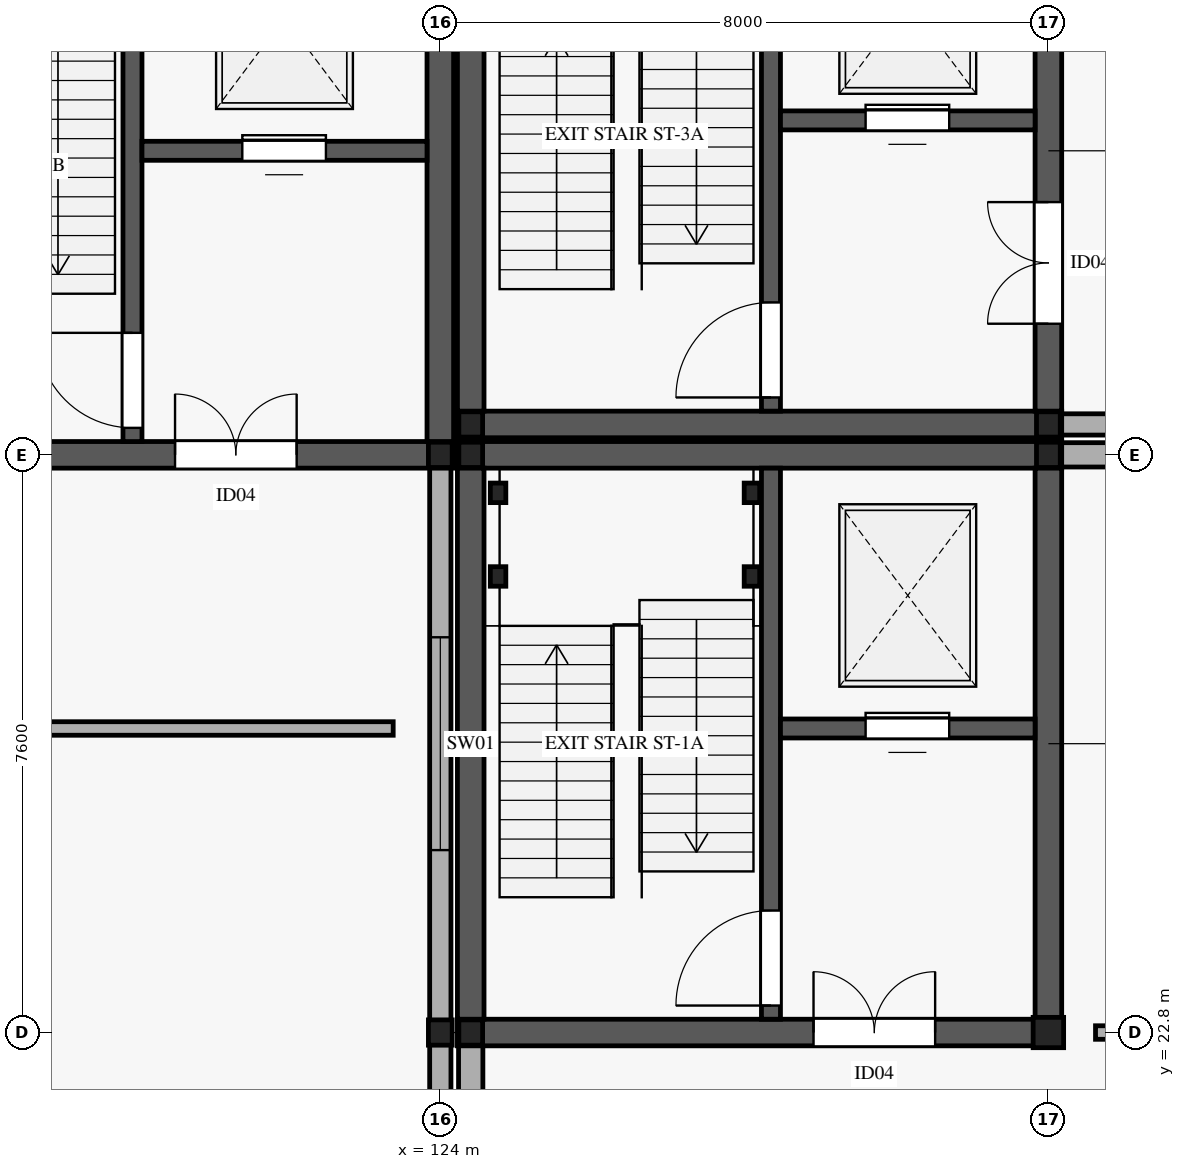
"""IFC4 building model, lengths in metres.
Left out: names, types, materials, properties, quantities, classifications, styles, units other than length and angle.
Written with IfcOpenShell. Run it as: python <this file> out.ifc"""

import sys

from ifc_helpers import new_model, si_unit, direction, frame, frame_2d, origin, origin_2d, place, context, subcontext, project, spatial, rectangle, i_section, extrude, element, fill, save


model = new_model("IFC4")
c1 = context("Model", 3, precision=1e-05, world=origin(), true_north=direction((0.0, 1.0)))
c2 = subcontext(c1, "Body", "Model", "MODEL_VIEW")
j1 = project(units=[si_unit("LENGTHUNIT", "METRE"), si_unit("PLANEANGLEUNIT", "RADIAN")], contexts=[c1])
p1 = place(None, origin())
s1 = spatial("IfcSite", under=j1, at=p1, CompositionType="ELEMENT")
p2 = place(p1, origin())
s2 = spatial("IfcBuilding", under=s1, at=p2, CompositionType="ELEMENT")
p3 = place(p2, origin())
s3 = spatial("IfcBuildingStorey", under=s2, at=p3, CompositionType="ELEMENT", Elevation=0.0)
for number, where, z_axis, x_axis in (
    (1, (124.4, 22.8, 0.0), (0.0, 0.0, 1.0), (1.0, 0.0, 0.0)),
    (2, (124.4, 30.4, 0.0), (0.0, 0.0, 1.0), (1.0, 0.0, 0.0)),
):
    element("IfcColumn", number, at=place(p3, frame(where, z_axis=z_axis, x_axis=x_axis)), inside=s3, PredefinedType="COLUMN", context=c2, shape_type="SweptSolid", body=[
        extrude(i_section(OverallWidth=0.313, OverallDepth=0.333, WebThickness=0.018, FlangeThickness=0.028, FilletRadius=0.015, at=origin_2d()), origin(), (0.0, 0.0, 1.0), 5.185),
    ])
p4 = place(p3, frame((132.0, 22.8, 0.0), z_axis=(0.0, 0.0, 1.0), x_axis=(1.0, 0.0, 0.0)))
e3 = element("IfcColumn", 3, at=p4, inside=s3, PredefinedType="COLUMN", context=c2, shape_type="SweptSolid", body=[
    extrude(i_section(OverallWidth=0.401, OverallDepth=0.399, WebThickness=0.025, FlangeThickness=0.04, FilletRadius=0.015, at=origin_2d()), origin(), (0.0, 0.0, 1.0), 5.185),
])
for number, where, z_axis, x_axis in (
    (4, (132.0, 30.4, 0.0), (0.0, 0.0, 1.0), (1.0, 0.0, 0.0)),
    (5, (124.4, 30.8, 0.0), (0.0, 0.0, 1.0), (1.0, 0.0, 0.0)),
    (6, (132.0, 30.8, 0.0), (0.0, 0.0, 1.0), (1.0, 0.0, 0.0)),
    (7, (124.0, 22.8, 0.0), (0.0, 0.0, 1.0), (1.0, 0.0, 0.0)),
    (8, (124.0, 30.4, 0.0), (0.0, 0.0, 1.0), (1.0, 0.0, 0.0)),
):
    element("IfcColumn", number, at=place(p3, frame(where, z_axis=z_axis, x_axis=x_axis)), inside=s3, PredefinedType="COLUMN", context=c2, shape_type="SweptSolid", body=[
        extrude(i_section(OverallWidth=0.313, OverallDepth=0.333, WebThickness=0.018, FlangeThickness=0.028, FilletRadius=0.015, at=origin_2d()), origin(), (0.0, 0.0, 1.0), 5.185),
    ])
p5 = place(p3, frame((124.4, 15.18, 0.0), z_axis=(0.0, 0.0, 1.0), x_axis=(0.0, 1.0, 0.0)))
e9 = element("IfcWall", 9, at=p5, inside=s3, PredefinedType="STANDARD", context=c2, shape_type="SweptSolid", body=[
    extrude(rectangle(XDim=7.64, YDim=0.32, at=frame_2d((3.82, 0.0))), origin(), (0.0, 0.0, 1.0), 4.25),
])
p6 = place(p5, frame((3.02, 0.0, 0.75)))
e10 = element("IfcOpeningElement", 10, at=p6, cuts=e9, PredefinedType="OPENING", context=c2, shape_type="SweptSolid", body=[
    extrude(rectangle(XDim=1.6, YDim=2.0, at=frame_2d((0.8, 1.0))), frame((0.0, 0.17, 0.0), z_axis=(0.0, -1.0, 0.0), x_axis=(1.0, 0.0, 0.0)), (0.0, 0.0, 1.0), 0.34),
])
p7 = place(p3, frame((131.98, 30.4, 0.0), z_axis=(0.0, 0.0, 1.0), x_axis=(1.0, 0.0, 0.0)))
e11 = element("IfcWall", 11, at=p7, inside=s3, PredefinedType="STANDARD", context=c2, shape_type="SweptSolid", body=[
    extrude(rectangle(XDim=8.04, YDim=0.32, at=frame_2d((4.02, 0.0))), origin(), (0.0, 0.0, 1.0), 4.25),
])
p8 = place(p7, frame((3.12, 0.0, 0.75)))
e12 = element("IfcOpeningElement", 12, at=p8, cuts=e11, PredefinedType="OPENING", context=c2, shape_type="SweptSolid", body=[
    extrude(rectangle(XDim=1.8, YDim=2.0, at=frame_2d((0.9, 1.0))), frame((0.0, 0.17, 0.0), z_axis=(0.0, -1.0, 0.0), x_axis=(1.0, 0.0, 0.0)), (0.0, 0.0, 1.0), 0.34),
])
p9 = place(p3, frame((140.02, 30.8, 0.0), z_axis=(0.0, 0.0, 1.0), x_axis=(-1.0, 0.0, 0.0)))
e13 = element("IfcWall", 13, at=p9, inside=s3, PredefinedType="STANDARD", context=c2, shape_type="SweptSolid", body=[
    extrude(rectangle(XDim=8.04, YDim=0.28, at=frame_2d((4.02, 0.0))), origin(), (0.0, 0.0, 1.0), 4.25),
])
p10 = place(p9, frame((2.62, 0.0, 0.75)))
e14 = element("IfcOpeningElement", 14, at=p10, cuts=e13, PredefinedType="OPENING", context=c2, shape_type="SweptSolid", body=[
    extrude(rectangle(XDim=2.8, YDim=2.0, at=frame_2d((1.4, 1.0))), frame((0.0, 0.15, 0.0), z_axis=(0.0, -1.0, 0.0), x_axis=(1.0, 0.0, 0.0)), (0.0, 0.0, 1.0), 0.3),
])
p11 = place(p3, frame((124.0, 30.42, 0.0), z_axis=(0.0, 0.0, 1.0), x_axis=(0.0, -1.0, 0.0)))
e15 = element("IfcWall", 15, at=p11, inside=s3, PredefinedType="STANDARD", context=c2, shape_type="SweptSolid", body=[
    extrude(rectangle(XDim=7.64, YDim=0.28, at=frame_2d((3.82, 0.0))), origin(), (0.0, 0.0, 1.0), 4.25),
])
p12 = place(p11, frame((2.42, 0.0, 0.75)))
e16 = element("IfcOpeningElement", 16, at=p12, cuts=e15, PredefinedType="OPENING", context=c2, shape_type="SweptSolid", body=[
    extrude(rectangle(XDim=2.8, YDim=2.0, at=frame_2d((1.4, 1.0))), frame((0.0, 0.15, 0.0), z_axis=(0.0, -1.0, 0.0), x_axis=(1.0, 0.0, 0.0)), (0.0, 0.0, 1.0), 0.3),
])
p13 = place(p3, frame((124.0, 22.82, 0.0), z_axis=(0.0, 0.0, 1.0), x_axis=(0.0, -1.0, 0.0)))
e17 = element("IfcWall", 17, at=p13, inside=s3, PredefinedType="STANDARD", context=c2, shape_type="SweptSolid", body=[
    extrude(rectangle(XDim=7.64, YDim=0.28, at=frame_2d((3.82, 0.0))), origin(), (0.0, 0.0, 1.0), 4.25),
])
p14 = place(p13, frame((2.22, 0.0, 0.75)))
e18 = element("IfcOpeningElement", 18, at=p14, cuts=e17, PredefinedType="OPENING", context=c2, shape_type="SweptSolid", body=[
    extrude(rectangle(XDim=3.2, YDim=2.0, at=frame_2d((1.6, 1.0))), frame((0.0, 0.15, 0.0), z_axis=(0.0, -1.0, 0.0), x_axis=(1.0, 0.0, 0.0)), (0.0, 0.0, 1.0), 0.3),
])
p15 = place(p3, frame((124.225, 22.8, 0.0), z_axis=(0.0, 0.0, 1.0), x_axis=(1.0, 0.0, 0.0)))
e19 = element("IfcWall", 19, at=p15, inside=s3, PredefinedType="SHEAR", context=c2, shape_type="SweptSolid", body=[
    extrude(rectangle(XDim=7.95, YDim=0.35, at=frame_2d((3.975, 0.0))), origin(), (0.0, 0.0, 1.0), 5.19),
])
p16 = place(p15, frame((4.685, 0.0, 0.0)))
e20 = element("IfcOpeningElement", 20, at=p16, cuts=e19, PredefinedType="OPENING", context=c2, shape_type="SweptSolid", body=[
    extrude(rectangle(XDim=1.6, YDim=2.35, at=frame_2d((0.8, 1.175))), frame((0.0, 0.185, 0.0), z_axis=(0.0, -1.0, 0.0), x_axis=(1.0, 0.0, 0.0)), (0.0, 0.0, 1.0), 0.37),
])
p17 = place(p3, frame((124.225, 30.4, 0.0), z_axis=(0.0, 0.0, 1.0), x_axis=(1.0, 0.0, 0.0)))
e21 = element("IfcWall", 21, at=p17, inside=s3, PredefinedType="SHEAR", context=c2, shape_type="SweptSolid", body=[
    extrude(rectangle(XDim=7.95, YDim=0.35, at=frame_2d((3.975, 0.0))), origin(), (0.0, 0.0, 1.0), 5.19),
])
for number, where, z_axis, x_axis in (
    (22, (124.4, 22.975, 0.0), (0.0, 0.0, 1.0), (0.0, 1.0, 0.0)),
    (23, (132.0, 22.975, 0.0), (0.0, 0.0, 1.0), (0.0, 1.0, 0.0)),
):
    element("IfcWall", number, at=place(p3, frame(where, z_axis=z_axis, x_axis=x_axis)), inside=s3, PredefinedType="SHEAR", context=c2, shape_type="SweptSolid", body=[
        extrude(rectangle(XDim=7.25, YDim=0.35, at=frame_2d((3.625, 0.0))), origin(), (0.0, 0.0, 1.0), 5.19),
    ])
p18 = place(p3, frame((128.35, 22.975, 0.0), z_axis=(0.0, 0.0, 1.0), x_axis=(0.0, 1.0, 0.0)))
e24 = element("IfcWall", 24, at=p18, inside=s3, PredefinedType="SHEAR", context=c2, shape_type="SweptSolid", body=[
    extrude(rectangle(XDim=7.25, YDim=0.25, at=frame_2d((3.625, 0.0))), origin(), (0.0, 0.0, 1.0), 5.19),
])
p19 = place(p18, frame((0.18, 0.0, 0.0)))
e25 = element("IfcOpeningElement", 25, at=p19, cuts=e24, PredefinedType="OPENING", context=c2, shape_type="SweptSolid", body=[
    extrude(rectangle(XDim=1.25, YDim=2.2, at=frame_2d((0.625, 1.1))), frame((0.0, 0.135, 0.0), z_axis=(0.0, -1.0, 0.0), x_axis=(1.0, 0.0, 0.0)), (0.0, 0.0, 1.0), 0.27),
])
p20 = place(p3, frame((128.475, 26.8, 0.0), z_axis=(0.0, 0.0, 1.0), x_axis=(1.0, 0.0, 0.0)))
e26 = element("IfcWall", 26, at=p20, inside=s3, PredefinedType="SHEAR", context=c2, shape_type="SweptSolid", body=[
    extrude(rectangle(XDim=3.35, YDim=0.25, at=frame_2d((1.675, 0.0))), origin(), (0.0, 0.0, 1.0), 5.19),
])
p21 = place(p20, frame((1.12, 0.0, 0.0)))
e27 = element("IfcOpeningElement", 27, at=p21, cuts=e26, PredefinedType="OPENING", context=c2, shape_type="SweptSolid", body=[
    extrude(rectangle(XDim=1.1, YDim=2.2, at=frame_2d((0.55, 1.1))), frame((0.0, 0.135, 0.0), z_axis=(0.0, -1.0, 0.0), x_axis=(1.0, 0.0, 0.0)), (0.0, 0.0, 1.0), 0.27),
])
for number, where, z_axis, x_axis in (
    (28, (124.76, 28.8, -0.23), (0.0, 0.0, 1.0), (1.0, 0.0, 0.0)),
    (29, (128.1, 28.8, -0.23), (0.0, 0.0, 1.0), (1.0, 0.0, 0.0)),
    (30, (124.76, 29.9, -0.23), (0.0, 0.0, 1.0), (1.0, 0.0, 0.0)),
    (31, (128.1, 29.9, -0.23), (0.0, 0.0, 1.0), (1.0, 0.0, 0.0)),
):
    element("IfcColumn", number, at=place(p3, frame(where, z_axis=z_axis, x_axis=x_axis)), inside=s3, PredefinedType="COLUMN", context=c2, shape_type="SweptSolid", body=[
        extrude(i_section(OverallWidth=0.204, OverallDepth=0.257, WebThickness=0.009, FlangeThickness=0.016, FilletRadius=0.013, at=origin_2d()), origin(), (0.0, 0.0, 1.0), 5.625),
    ])
p22 = place(p3, frame((124.225, 30.8, 0.0), z_axis=(0.0, 0.0, 1.0), x_axis=(1.0, 0.0, 0.0)))
e32 = element("IfcWall", 32, at=p22, inside=s3, PredefinedType="SHEAR", context=c2, shape_type="SweptSolid", body=[
    extrude(rectangle(XDim=7.95, YDim=0.35, at=frame_2d((3.975, 0.0))), origin(), (0.0, 0.0, 1.0), 5.19),
])
p23 = place(p3, frame((124.4, 30.975, 0.0), z_axis=(0.0, 0.0, 1.0), x_axis=(0.0, 1.0, 0.0)))
e33 = element("IfcWall", 33, at=p23, inside=s3, PredefinedType="SHEAR", context=c2, shape_type="SweptSolid", body=[
    extrude(rectangle(XDim=6.85, YDim=0.35, at=frame_2d((3.425, 0.0))), origin(), (0.0, 0.0, 1.0), 5.19),
])
p24 = place(p3, frame((132.0, 30.975, 0.0), z_axis=(0.0, 0.0, 1.0), x_axis=(0.0, 1.0, 0.0)))
e34 = element("IfcWall", 34, at=p24, inside=s3, PredefinedType="SHEAR", context=c2, shape_type="SweptSolid", body=[
    extrude(rectangle(XDim=6.85, YDim=0.35, at=frame_2d((3.425, 0.0))), origin(), (0.0, 0.0, 1.0), 5.19),
])
p25 = place(p24, frame((1.15, 0.0, 0.0)))
e35 = element("IfcOpeningElement", 35, at=p25, cuts=e34, PredefinedType="OPENING", context=c2, shape_type="SweptSolid", body=[
    extrude(rectangle(XDim=1.6, YDim=2.35, at=frame_2d((0.8, 1.175))), frame((0.0, 0.185, 0.0), z_axis=(0.0, -1.0, 0.0), x_axis=(1.0, 0.0, 0.0)), (0.0, 0.0, 1.0), 0.37),
])
p26 = place(p3, frame((128.35, 30.975, 0.0), z_axis=(0.0, 0.0, 1.0), x_axis=(0.0, 1.0, 0.0)))
e36 = element("IfcWall", 36, at=p26, inside=s3, PredefinedType="SHEAR", context=c2, shape_type="SweptSolid", body=[
    extrude(rectangle(XDim=6.85, YDim=0.25, at=frame_2d((3.425, 0.0))), origin(), (0.0, 0.0, 1.0), 5.19),
])
p27 = place(p26, frame((0.18, 0.0, 0.0)))
e37 = element("IfcOpeningElement", 37, at=p27, cuts=e36, PredefinedType="OPENING", context=c2, shape_type="SweptSolid", body=[
    extrude(rectangle(XDim=1.25, YDim=2.2, at=frame_2d((0.625, 1.1))), frame((0.0, 0.135, 0.0), z_axis=(0.0, -1.0, 0.0), x_axis=(1.0, 0.0, 0.0)), (0.0, 0.0, 1.0), 0.27),
])
p28 = place(p3, frame((128.475, 34.8, 0.0), z_axis=(0.0, 0.0, 1.0), x_axis=(1.0, 0.0, 0.0)))
e38 = element("IfcWall", 38, at=p28, inside=s3, PredefinedType="SHEAR", context=c2, shape_type="SweptSolid", body=[
    extrude(rectangle(XDim=3.35, YDim=0.25, at=frame_2d((1.675, 0.0))), origin(), (0.0, 0.0, 1.0), 5.19),
])
p29 = place(p28, frame((1.12, 0.0, 0.0)))
e39 = element("IfcOpeningElement", 39, at=p29, cuts=e38, PredefinedType="OPENING", context=c2, shape_type="SweptSolid", body=[
    extrude(rectangle(XDim=1.1, YDim=2.2, at=frame_2d((0.55, 1.1))), frame((0.0, 0.135, 0.0), z_axis=(0.0, -1.0, 0.0), x_axis=(1.0, 0.0, 0.0)), (0.0, 0.0, 1.0), 0.27),
])
p30 = place(p3, frame((115.825, 30.4, 0.0), z_axis=(0.0, 0.0, 1.0), x_axis=(1.0, 0.0, 0.0)))
e40 = element("IfcWall", 40, at=p30, inside=s3, PredefinedType="SHEAR", context=c2, shape_type="SweptSolid", body=[
    extrude(rectangle(XDim=8.35, YDim=0.35, at=frame_2d((4.175, 0.0))), origin(), (0.0, 0.0, 1.0), 5.19),
])
p31 = place(p30, frame((4.685, 0.0, 0.0)))
e41 = element("IfcOpeningElement", 41, at=p31, cuts=e40, PredefinedType="OPENING", context=c2, shape_type="SweptSolid", body=[
    extrude(rectangle(XDim=1.6, YDim=2.35, at=frame_2d((0.8, 1.175))), frame((0.0, 0.185, 0.0), z_axis=(0.0, -1.0, 0.0), x_axis=(1.0, 0.0, 0.0)), (0.0, 0.0, 1.0), 0.37),
])
p32 = place(p3, frame((124.0, 30.575, 0.0), z_axis=(0.0, 0.0, 1.0), x_axis=(0.0, 1.0, 0.0)))
e42 = element("IfcWall", 42, at=p32, inside=s3, PredefinedType="SHEAR", context=c2, shape_type="SweptSolid", body=[
    extrude(rectangle(XDim=7.25, YDim=0.35, at=frame_2d((3.625, 0.0))), origin(), (0.0, 0.0, 1.0), 5.19),
])
p33 = place(p3, frame((119.95, 30.575, 0.0), z_axis=(0.0, 0.0, 1.0), x_axis=(0.0, 1.0, 0.0)))
e43 = element("IfcWall", 43, at=p33, inside=s3, PredefinedType="SHEAR", context=c2, shape_type="SweptSolid", body=[
    extrude(rectangle(XDim=7.25, YDim=0.25, at=frame_2d((3.625, 0.0))), origin(), (0.0, 0.0, 1.0), 5.19),
])
p34 = place(p33, frame((0.18, 0.0, 0.0)))
e44 = element("IfcOpeningElement", 44, at=p34, cuts=e43, PredefinedType="OPENING", context=c2, shape_type="SweptSolid", body=[
    extrude(rectangle(XDim=1.25, YDim=2.2, at=frame_2d((0.625, 1.1))), frame((0.0, 0.135, 0.0), z_axis=(0.0, -1.0, 0.0), x_axis=(1.0, 0.0, 0.0)), (0.0, 0.0, 1.0), 0.27),
])
p35 = place(p3, frame((120.075, 34.4, 0.0), z_axis=(0.0, 0.0, 1.0), x_axis=(1.0, 0.0, 0.0)))
e45 = element("IfcWall", 45, at=p35, inside=s3, PredefinedType="SHEAR", context=c2, shape_type="SweptSolid", body=[
    extrude(rectangle(XDim=3.75, YDim=0.25, at=frame_2d((1.875, 0.0))), origin(), (0.0, 0.0, 1.0), 5.19),
])
p36 = place(p35, frame((1.32, 0.0, 0.0)))
e46 = element("IfcOpeningElement", 46, at=p36, cuts=e45, PredefinedType="OPENING", context=c2, shape_type="SweptSolid", body=[
    extrude(rectangle(XDim=1.1, YDim=2.2, at=frame_2d((0.55, 1.1))), frame((0.0, 0.135, 0.0), z_axis=(0.0, -1.0, 0.0), x_axis=(1.0, 0.0, 0.0)), (0.0, 0.0, 1.0), 0.27),
])
p37 = place(p3, frame((132.62, 22.8, 0.0), z_axis=(0.0, 0.0, 1.0), x_axis=(1.0, 0.0, 0.0)))
e47 = element("IfcWall", 47, at=p37, inside=s3, PredefinedType="PARTITIONING", context=c2, shape_type="SweptSolid", body=[
    extrude(rectangle(XDim=19.16, YDim=0.178, at=frame_2d((9.58, 0.0))), origin(), (0.0, 0.0, 1.0), 4.05),
])
p38 = place(p37, frame((9.055, 0.0, 0.0)))
e48 = element("IfcOpeningElement", 48, at=p38, cuts=e47, PredefinedType="OPENING", context=c2, shape_type="SweptSolid", body=[
    extrude(rectangle(XDim=1.05, YDim=2.15, at=frame_2d((0.525, 1.075))), frame((0.0, 0.099, 0.0), z_axis=(0.0, -1.0, 0.0), x_axis=(1.0, 0.0, 0.0)), (0.0, 0.0, 1.0), 0.198),
])
p39 = place(p3, frame((108.22, 26.8, 0.0), z_axis=(0.0, 0.0, 1.0), x_axis=(1.0, 0.0, 0.0)))
e49 = element("IfcWall", 49, at=p39, inside=s3, PredefinedType="PARTITIONING", context=c2, shape_type="SweptSolid", body=[
    extrude(rectangle(XDim=15.16, YDim=0.178, at=frame_2d((7.58, 0.0))), origin(), (0.0, 0.0, 1.0), 4.05),
])
p40 = place(p39, frame((6.99, 0.0, 0.0)))
e50 = element("IfcOpeningElement", 50, at=p40, cuts=e49, PredefinedType="OPENING", context=c2, shape_type="SweptSolid", body=[
    extrude(rectangle(XDim=1.18, YDim=2.3, at=frame_2d((0.59, 1.15))), frame((0.0, 0.099, 0.0), z_axis=(0.0, -1.0, 0.0), x_axis=(1.0, 0.0, 0.0)), (0.0, 0.0, 1.0), 0.198),
])
p41 = place(p12, origin())
e51 = element("IfcWindow", 51, at=p41, inside=s3, PartitioningType="SINGLE_PANEL", PredefinedType="WINDOW", context=c2, shape_type="SweptSolid", body=[
    extrude(rectangle(XDim=2.8, YDim=2.0, at=frame_2d((1.4, 1.0))), frame((0.0, 0.03, 0.0), z_axis=(0.0, -1.0, 0.0), x_axis=(1.0, 0.0, 0.0)), (0.0, 0.0, 1.0), 0.06),
])
fill(e16, e51)
p42 = place(p19, origin())
e52 = element("IfcDoor", 52, at=p42, inside=s3, OperationType="SINGLE_SWING_LEFT", PredefinedType="DOOR", context=c2, shape_type="SweptSolid", body=[
    extrude(rectangle(XDim=1.25, YDim=2.2, at=frame_2d((0.625, 1.1))), frame((0.0, 0.025, 0.0), z_axis=(0.0, -1.0, 0.0), x_axis=(1.0, 0.0, 0.0)), (0.0, 0.0, 1.0), 0.05),
])
fill(e25, e52)
p43 = place(p16, origin())
e53 = element("IfcDoor", 53, at=p43, inside=s3, OperationType="DOUBLE_DOOR_SINGLE_SWING", PredefinedType="DOOR", context=c2, shape_type="SweptSolid", body=[
    extrude(rectangle(XDim=1.6, YDim=2.35, at=frame_2d((0.8, 1.175))), frame((0.0, 0.025, 0.0), z_axis=(0.0, -1.0, 0.0), x_axis=(1.0, 0.0, 0.0)), (0.0, 0.0, 1.0), 0.05),
])
fill(e20, e53)
p44 = place(p21, origin())
e54 = element("IfcDoor", 54, at=p44, inside=s3, OperationType="SLIDING_TO_LEFT", PredefinedType="DOOR", context=c2, shape_type="SweptSolid", body=[
    extrude(rectangle(XDim=1.1, YDim=2.2, at=frame_2d((0.55, 1.1))), frame((0.0, 0.025, 0.0), z_axis=(0.0, -1.0, 0.0), x_axis=(1.0, 0.0, 0.0)), (0.0, 0.0, 1.0), 0.05),
])
fill(e27, e54)
p45 = place(p27, origin())
e55 = element("IfcDoor", 55, at=p45, inside=s3, OperationType="SINGLE_SWING_LEFT", PredefinedType="DOOR", context=c2, shape_type="SweptSolid", body=[
    extrude(rectangle(XDim=1.25, YDim=2.2, at=frame_2d((0.625, 1.1))), frame((0.0, 0.025, 0.0), z_axis=(0.0, -1.0, 0.0), x_axis=(1.0, 0.0, 0.0)), (0.0, 0.0, 1.0), 0.05),
])
fill(e37, e55)
p46 = place(p25, origin())
e56 = element("IfcDoor", 56, at=p46, inside=s3, OperationType="DOUBLE_DOOR_SINGLE_SWING", PredefinedType="DOOR", context=c2, shape_type="SweptSolid", body=[
    extrude(rectangle(XDim=1.6, YDim=2.35, at=frame_2d((0.8, 1.175))), frame((0.0, 0.025, 0.0), z_axis=(0.0, -1.0, 0.0), x_axis=(1.0, 0.0, 0.0)), (0.0, 0.0, 1.0), 0.05),
])
fill(e35, e56)
p47 = place(p29, origin())
e57 = element("IfcDoor", 57, at=p47, inside=s3, OperationType="SLIDING_TO_LEFT", PredefinedType="DOOR", context=c2, shape_type="SweptSolid", body=[
    extrude(rectangle(XDim=1.1, YDim=2.2, at=frame_2d((0.55, 1.1))), frame((0.0, 0.025, 0.0), z_axis=(0.0, -1.0, 0.0), x_axis=(1.0, 0.0, 0.0)), (0.0, 0.0, 1.0), 0.05),
])
fill(e39, e57)
p48 = place(p34, origin())
e58 = element("IfcDoor", 58, at=p48, inside=s3, OperationType="SINGLE_SWING_RIGHT", PredefinedType="DOOR", context=c2, shape_type="SweptSolid", body=[
    extrude(rectangle(XDim=1.25, YDim=2.2, at=frame_2d((0.625, 1.1))), frame((0.0, 0.025, 0.0), z_axis=(0.0, -1.0, 0.0), x_axis=(1.0, 0.0, 0.0)), (0.0, 0.0, 1.0), 0.05),
])
fill(e44, e58)
p49 = place(p31, origin())
e59 = element("IfcDoor", 59, at=p49, inside=s3, OperationType="DOUBLE_DOOR_SINGLE_SWING", PredefinedType="DOOR", context=c2, shape_type="SweptSolid", body=[
    extrude(rectangle(XDim=1.6, YDim=2.35, at=frame_2d((0.8, 1.175))), frame((0.0, 0.025, 0.0), z_axis=(0.0, -1.0, 0.0), x_axis=(1.0, 0.0, 0.0)), (0.0, 0.0, 1.0), 0.05),
])
fill(e41, e59)
p50 = place(p36, origin())
e60 = element("IfcDoor", 60, at=p50, inside=s3, OperationType="SLIDING_TO_LEFT", PredefinedType="DOOR", context=c2, shape_type="SweptSolid", body=[
    extrude(rectangle(XDim=1.1, YDim=2.2, at=frame_2d((0.55, 1.1))), frame((0.0, 0.025, 0.0), z_axis=(0.0, -1.0, 0.0), x_axis=(1.0, 0.0, 0.0)), (0.0, 0.0, 1.0), 0.05),
])
fill(e46, e60)
save(model, sys.argv[1])
